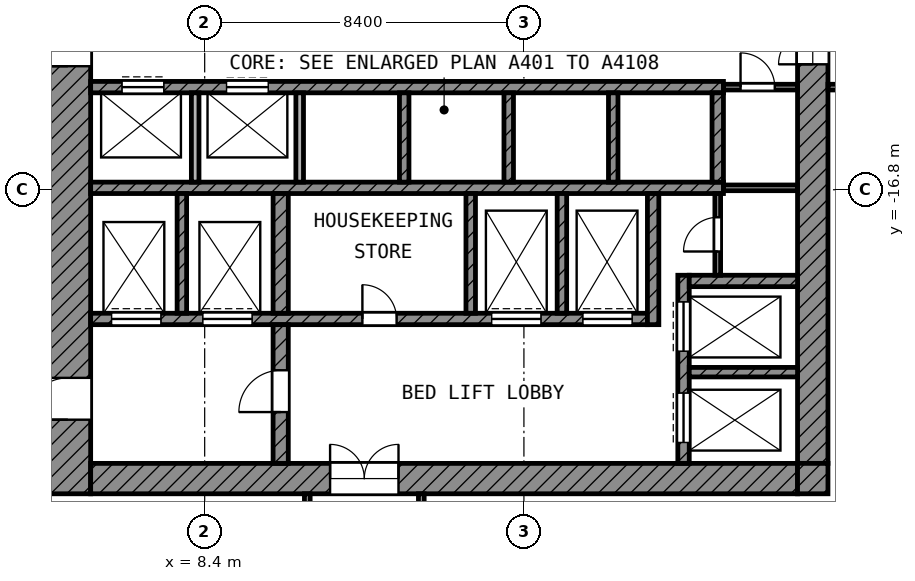
"""IFC4 building model, lengths in metres.
Left out: names, types, materials, properties, quantities, classifications, styles, units other than length and angle.
Written with IfcOpenShell. Run it as: python <this file> out.ifc"""

import sys

from ifc_helpers import new_model, si_unit, direction, frame, frame_2d, origin, place, context, subcontext, project, spatial, rectangle, extrude, element, fill, save


model = new_model("IFC4")
c1 = context("Model", 3, precision=1e-05, world=origin(), true_north=direction((0.0, 1.0)))
c2 = subcontext(c1, "Body", "Model", "MODEL_VIEW")
j1 = project(units=[si_unit("LENGTHUNIT", "METRE"), si_unit("PLANEANGLEUNIT", "RADIAN")], contexts=[c1])
p1 = place(None, origin())
s1 = spatial("IfcSite", under=j1, at=p1, CompositionType="ELEMENT")
p2 = place(p1, origin())
s2 = spatial("IfcBuilding", under=s1, at=p2, CompositionType="ELEMENT")
p3 = place(p2, frame((0.0, 0.0, 226.4)))
s3 = spatial("IfcBuildingStorey", under=s2, at=p3, CompositionType="ELEMENT", Elevation=226.4)
p4 = place(p3, frame((4.8, -24.8, 0.0), z_axis=(0.0, 0.0, 1.0), x_axis=(0.0, 1.0, 0.0)))
e1 = element("IfcWall", 1, at=p4, inside=s3, PredefinedType="SHEAR", context=c2, shape_type="SweptSolid", body=[
    extrude(rectangle(XDim=19.4, YDim=1.2, at=frame_2d((9.7, 0.0))), origin(), (0.0, 0.0, 1.0), 3.6),
])
p5 = place(p4, frame((11.25, 0.0, 0.0)))
e2 = element("IfcOpeningElement", 2, at=p5, cuts=e1, PredefinedType="OPENING", context=c2, shape_type="SweptSolid", body=[
    extrude(rectangle(XDim=1.1, YDim=2.1, at=frame_2d((0.55, 1.05))), frame((0.0, 0.61, 0.0), z_axis=(0.0, -1.0, 0.0), x_axis=(1.0, 0.0, 0.0)), (0.0, 0.0, 1.0), 1.22),
])
p6 = place(p4, frame((1.95, 0.0, 0.0)))
e3 = element("IfcOpeningElement", 3, at=p6, cuts=e1, PredefinedType="OPENING", context=c2, shape_type="SweptSolid", body=[
    extrude(rectangle(XDim=1.1, YDim=2.1, at=frame_2d((0.55, 1.05))), frame((0.0, 0.61, 0.0), z_axis=(0.0, -1.0, 0.0), x_axis=(1.0, 0.0, 0.0)), (0.0, 0.0, 1.0), 1.22),
])
p7 = place(p3, frame((24.4, -24.0, 0.0), z_axis=(0.0, 0.0, 1.0), x_axis=(0.0, 1.0, 0.0)))
e4 = element("IfcWall", 4, at=p7, inside=s3, PredefinedType="SHEAR", context=c2, shape_type="SweptSolid", body=[
    extrude(rectangle(XDim=18.6, YDim=0.8, at=frame_2d((9.3, 0.0))), origin(), (0.0, 0.0, 1.0), 3.6),
])
p8 = place(p7, frame((10.5, 0.0, 0.0)))
e5 = element("IfcOpeningElement", 5, at=p8, cuts=e4, PredefinedType="OPENING", context=c2, shape_type="SweptSolid", body=[
    extrude(rectangle(XDim=1.8, YDim=2.1, at=frame_2d((0.9, 1.05))), frame((0.0, 0.41, 0.0), z_axis=(0.0, -1.0, 0.0), x_axis=(1.0, 0.0, 0.0)), (0.0, 0.0, 1.0), 0.82),
])
p9 = place(p3, frame((5.4, -24.4, 0.0), z_axis=(0.0, 0.0, 1.0), x_axis=(1.0, 0.0, 0.0)))
e6 = element("IfcWall", 6, at=p9, inside=s3, PredefinedType="SHEAR", context=c2, shape_type="SweptSolid", body=[
    extrude(rectangle(XDim=18.6, YDim=0.8, at=frame_2d((9.3, 0.0))), origin(), (0.0, 0.0, 1.0), 3.6),
])
p10 = place(p9, frame((6.3, 0.0, 0.0)))
e7 = element("IfcOpeningElement", 7, at=p10, cuts=e6, PredefinedType="OPENING", context=c2, shape_type="SweptSolid", body=[
    extrude(rectangle(XDim=1.8, YDim=2.1, at=frame_2d((0.9, 1.05))), frame((0.0, 0.41, 0.0), z_axis=(0.0, -1.0, 0.0), x_axis=(1.0, 0.0, 0.0)), (0.0, 0.0, 1.0), 0.82),
])
p11 = place(p3, frame((24.4, -24.8, 0.0), z_axis=(0.0, 0.0, 1.0), x_axis=(0.0, 1.0, 0.0)))
e8 = element("IfcWall", 8, at=p11, inside=s3, PredefinedType="SHEAR", context=c2, shape_type="SweptSolid", body=[
    extrude(rectangle(XDim=0.8, YDim=0.8, at=frame_2d((0.4, 0.0))), origin(), (0.0, 0.0, 1.0), 3.6),
])
p12 = place(p3, frame((5.4, -14.1, 0.0), z_axis=(0.0, 0.0, 1.0), x_axis=(1.0, 0.0, 0.0)))
e9 = element("IfcWall", 9, at=p12, inside=s3, PredefinedType="SHEAR", context=c2, shape_type="SweptSolid", body=[
    extrude(rectangle(XDim=16.65, YDim=0.3, at=frame_2d((8.325, 0.0))), origin(), (0.0, 0.0, 1.0), 3.6),
])
p13 = place(p12, frame((0.825, 0.0, 0.0)))
e10 = element("IfcOpeningElement", 10, at=p13, cuts=e9, PredefinedType="OPENING", context=c2, shape_type="SweptSolid", body=[
    extrude(rectangle(XDim=1.1, YDim=2.1, at=frame_2d((0.55, 1.05))), frame((0.0, 0.16, 0.0), z_axis=(0.0, -1.0, 0.0), x_axis=(1.0, 0.0, 0.0)), (0.0, 0.0, 1.0), 0.32),
])
p14 = place(p12, frame((3.575, 0.0, 0.0)))
e11 = element("IfcOpeningElement", 11, at=p14, cuts=e9, PredefinedType="OPENING", context=c2, shape_type="SweptSolid", body=[
    extrude(rectangle(XDim=1.1, YDim=2.1, at=frame_2d((0.55, 1.05))), frame((0.0, 0.16, 0.0), z_axis=(0.0, -1.0, 0.0), x_axis=(1.0, 0.0, 0.0)), (0.0, 0.0, 1.0), 0.32),
])
p15 = place(p3, frame((5.4, -16.75, 0.0), z_axis=(0.0, 0.0, 1.0), x_axis=(1.0, 0.0, 0.0)))
e12 = element("IfcWall", 12, at=p15, inside=s3, PredefinedType="SHEAR", context=c2, shape_type="SweptSolid", body=[
    extrude(rectangle(XDim=16.65, YDim=0.3, at=frame_2d((8.325, 0.0))), origin(), (0.0, 0.0, 1.0), 3.6),
])
p16 = place(p3, frame((5.4, -20.2, 0.0), z_axis=(0.0, 0.0, 1.0), x_axis=(1.0, 0.0, 0.0)))
e13 = element("IfcWall", 13, at=p16, inside=s3, PredefinedType="SHEAR", context=c2, shape_type="SweptSolid", body=[
    extrude(rectangle(XDim=14.65, YDim=0.3, at=frame_2d((7.325, 0.0))), origin(), (0.0, 0.0, 1.0), 3.6),
])
p17 = place(p16, frame((10.55, 0.0, 0.0)))
e14 = element("IfcOpeningElement", 14, at=p17, cuts=e13, PredefinedType="OPENING", context=c2, shape_type="SweptSolid", body=[
    extrude(rectangle(XDim=1.3, YDim=2.1, at=frame_2d((0.65, 1.05))), frame((0.0, 0.16, 0.0), z_axis=(0.0, -1.0, 0.0), x_axis=(1.0, 0.0, 0.0)), (0.0, 0.0, 1.0), 0.32),
])
p18 = place(p16, frame((12.95, 0.0, 0.0)))
e15 = element("IfcOpeningElement", 15, at=p18, cuts=e13, PredefinedType="OPENING", context=c2, shape_type="SweptSolid", body=[
    extrude(rectangle(XDim=1.3, YDim=2.1, at=frame_2d((0.65, 1.05))), frame((0.0, 0.16, 0.0), z_axis=(0.0, -1.0, 0.0), x_axis=(1.0, 0.0, 0.0)), (0.0, 0.0, 1.0), 0.32),
])
p19 = place(p16, frame((0.55, 0.0, 0.0)))
e16 = element("IfcOpeningElement", 16, at=p19, cuts=e13, PredefinedType="OPENING", context=c2, shape_type="SweptSolid", body=[
    extrude(rectangle(XDim=1.3, YDim=2.1, at=frame_2d((0.65, 1.05))), frame((0.0, 0.16, 0.0), z_axis=(0.0, -1.0, 0.0), x_axis=(1.0, 0.0, 0.0)), (0.0, 0.0, 1.0), 0.32),
])
p20 = place(p16, frame((2.95, 0.0, 0.0)))
e17 = element("IfcOpeningElement", 17, at=p20, cuts=e13, PredefinedType="OPENING", context=c2, shape_type="SweptSolid", body=[
    extrude(rectangle(XDim=1.3, YDim=2.1, at=frame_2d((0.65, 1.05))), frame((0.0, 0.16, 0.0), z_axis=(0.0, -1.0, 0.0), x_axis=(1.0, 0.0, 0.0)), (0.0, 0.0, 1.0), 0.32),
])
p21 = place(p16, frame((7.15, 0.0, 0.0)))
e18 = element("IfcOpeningElement", 18, at=p21, cuts=e13, PredefinedType="OPENING", context=c2, shape_type="SweptSolid", body=[
    extrude(rectangle(XDim=0.9, YDim=2.1, at=frame_2d((0.45, 1.05))), frame((0.0, 0.16, 0.0), z_axis=(0.0, -1.0, 0.0), x_axis=(1.0, 0.0, 0.0)), (0.0, 0.0, 1.0), 0.32),
])
p22 = place(p3, frame((10.4, -24.0, 0.0), z_axis=(0.0, 0.0, 1.0), x_axis=(0.0, 1.0, 0.0)))
e19 = element("IfcWall", 19, at=p22, inside=s3, PredefinedType="SHEAR", context=c2, shape_type="SweptSolid", body=[
    extrude(rectangle(XDim=3.65, YDim=0.4, at=frame_2d((1.825, 0.0))), origin(), (0.0, 0.0, 1.0), 3.6),
])
p23 = place(p22, frame((1.35, 0.0, 0.0)))
e20 = element("IfcOpeningElement", 20, at=p23, cuts=e19, PredefinedType="OPENING", context=c2, shape_type="SweptSolid", body=[
    extrude(rectangle(XDim=1.1, YDim=2.1, at=frame_2d((0.55, 1.05))), frame((0.0, 0.21, 0.0), z_axis=(0.0, -1.0, 0.0), x_axis=(1.0, 0.0, 0.0)), (0.0, 0.0, 1.0), 0.42),
])
p24 = place(p3, frame((10.4, -20.05, 0.0), z_axis=(0.0, 0.0, 1.0), x_axis=(0.0, 1.0, 0.0)))
e21 = element("IfcWall", 21, at=p24, inside=s3, PredefinedType="SHEAR", context=c2, shape_type="SweptSolid", body=[
    extrude(rectangle(XDim=3.15, YDim=0.4, at=frame_2d((1.575, 0.0))), origin(), (0.0, 0.0, 1.0), 3.6),
])
p25 = place(p3, frame((20.2, -20.35, 0.0), z_axis=(0.0, 0.0, 1.0), x_axis=(0.0, 1.0, 0.0)))
e22 = element("IfcWall", 22, at=p25, inside=s3, PredefinedType="SHEAR", context=c2, shape_type="SweptSolid", body=[
    extrude(rectangle(XDim=3.45, YDim=0.3, at=frame_2d((1.725, 0.0))), origin(), (0.0, 0.0, 1.0), 3.6),
])
p26 = place(p3, frame((21.9, -16.6, 0.0), z_axis=(0.0, 0.0, 1.0), x_axis=(0.0, 1.0, 0.0)))
e23 = element("IfcWall", 23, at=p26, inside=s3, PredefinedType="SHEAR", context=c2, shape_type="SweptSolid", body=[
    extrude(rectangle(XDim=2.35, YDim=0.3, at=frame_2d((1.175, 0.0))), origin(), (0.0, 0.0, 1.0), 3.6),
])
p27 = place(p3, frame((21.15, -19.2, 0.0), z_axis=(0.0, 0.0, 1.0), x_axis=(1.0, 0.0, 0.0)))
e24 = element("IfcWall", 24, at=p27, inside=s3, PredefinedType="SHEAR", context=c2, shape_type="SweptSolid", body=[
    extrude(rectangle(XDim=2.85, YDim=0.3, at=frame_2d((1.425, 0.0))), origin(), (0.0, 0.0, 1.0), 3.6),
])
p28 = place(p3, frame((21.0, -24.0, 0.0), z_axis=(0.0, 0.0, 1.0), x_axis=(0.0, 1.0, 0.0)))
e25 = element("IfcWall", 25, at=p28, inside=s3, PredefinedType="SHEAR", context=c2, shape_type="SweptSolid", body=[
    extrude(rectangle(XDim=4.95, YDim=0.3, at=frame_2d((2.475, 0.0))), origin(), (0.0, 0.0, 1.0), 3.6),
])
p29 = place(p28, frame((2.95, 0.0, 0.0)))
e26 = element("IfcOpeningElement", 26, at=p29, cuts=e25, PredefinedType="OPENING", context=c2, shape_type="SweptSolid", body=[
    extrude(rectangle(XDim=1.3, YDim=2.1, at=frame_2d((0.65, 1.05))), frame((0.0, 0.16, 0.0), z_axis=(0.0, -1.0, 0.0), x_axis=(1.0, 0.0, 0.0)), (0.0, 0.0, 1.0), 0.32),
])
p30 = place(p28, frame((0.55, 0.0, 0.0)))
e27 = element("IfcOpeningElement", 27, at=p30, cuts=e25, PredefinedType="OPENING", context=c2, shape_type="SweptSolid", body=[
    extrude(rectangle(XDim=1.3, YDim=2.1, at=frame_2d((0.65, 1.05))), frame((0.0, 0.16, 0.0), z_axis=(0.0, -1.0, 0.0), x_axis=(1.0, 0.0, 0.0)), (0.0, 0.0, 1.0), 0.32),
])
p31 = place(p3, frame((21.15, -21.6, 0.0), z_axis=(0.0, 0.0, 1.0), x_axis=(1.0, 0.0, 0.0)))
e28 = element("IfcWall", 28, at=p31, inside=s3, PredefinedType="SHEAR", context=c2, shape_type="SweptSolid", body=[
    extrude(rectangle(XDim=2.85, YDim=0.25, at=frame_2d((1.425, 0.0))), origin(), (0.0, 0.0, 1.0), 3.6),
])
for number, where, z_axis, x_axis in (
    (29, (7.8, -20.05, 0.0), (0.0, 0.0, 1.0), (0.0, 1.0, 0.0)),
    (30, (15.4, -20.05, 0.0), (0.0, 0.0, 1.0), (0.0, 1.0, 0.0)),
    (31, (17.8, -20.05, 0.0), (0.0, 0.0, 1.0), (0.0, 1.0, 0.0)),
):
    element("IfcWall", number, at=place(p3, frame(where, z_axis=z_axis, x_axis=x_axis)), inside=s3, PredefinedType="SHEAR", context=c2, shape_type="SweptSolid", body=[
        extrude(rectangle(XDim=3.15, YDim=0.25, at=frame_2d((1.575, 0.0))), origin(), (0.0, 0.0, 1.0), 3.6),
    ])
for number, where, z_axis, x_axis in (
    (32, (8.15, -16.6, 0.0), (0.0, 0.0, 1.0), (0.0, 1.0, 0.0)),
    (33, (10.9, -16.6, 0.0), (0.0, 0.0, 1.0), (0.0, 1.0, 0.0)),
):
    element("IfcWall", number, at=place(p3, frame(where, z_axis=z_axis, x_axis=x_axis)), inside=s3, PredefinedType="PARTITIONING", context=c2, shape_type="SweptSolid", body=[
        extrude(rectangle(XDim=2.35, YDim=0.2, at=frame_2d((1.175, 0.0))), origin(), (0.0, 0.0, 1.0), 3.6),
    ])
for number, where, z_axis, x_axis in (
    (34, (13.65, -16.6, 0.0), (0.0, 0.0, 1.0), (0.0, 1.0, 0.0)),
    (35, (16.4, -16.6, 0.0), (0.0, 0.0, 1.0), (0.0, 1.0, 0.0)),
    (36, (19.15, -16.6, 0.0), (0.0, 0.0, 1.0), (0.0, 1.0, 0.0)),
):
    element("IfcWall", number, at=place(p3, frame(where, z_axis=z_axis, x_axis=x_axis)), inside=s3, PredefinedType="SHEAR", context=c2, shape_type="SweptSolid", body=[
        extrude(rectangle(XDim=2.35, YDim=0.25, at=frame_2d((1.175, 0.0))), origin(), (0.0, 0.0, 1.0), 3.6),
    ])
p32 = place(p3, frame((21.9, -19.05, 0.0), z_axis=(0.0, 0.0, 1.0), x_axis=(0.0, 1.0, 0.0)))
e37 = element("IfcWall", 37, at=p32, inside=s3, PredefinedType="PARTITIONING", context=c2, shape_type="SweptSolid", body=[
    extrude(rectangle(XDim=2.15, YDim=0.15, at=frame_2d((1.075, 0.0))), origin(), (0.0, 0.0, 1.0), 3.6),
])
p33 = place(p32, frame((0.625, 0.0, 0.0)))
e38 = element("IfcOpeningElement", 38, at=p33, cuts=e37, PredefinedType="OPENING", context=c2, shape_type="SweptSolid", body=[
    extrude(rectangle(XDim=0.9, YDim=2.1, at=frame_2d((0.45, 1.05))), frame((0.0, 0.085, 0.0), z_axis=(0.0, -1.0, 0.0), x_axis=(1.0, 0.0, 0.0)), (0.0, 0.0, 1.0), 0.17),
])
p34 = place(p3, frame((22.05, -16.75, 0.0), z_axis=(0.0, 0.0, 1.0), x_axis=(1.0, 0.0, 0.0)))
e39 = element("IfcWall", 39, at=p34, inside=s3, PredefinedType="PARTITIONING", context=c2, shape_type="SweptSolid", body=[
    extrude(rectangle(XDim=1.95, YDim=0.15, at=frame_2d((0.975, 0.0))), origin(), (0.0, 0.0, 1.0), 3.6),
])
p35 = place(p3, frame((22.05, -14.1, 0.0), z_axis=(0.0, 0.0, 1.0), x_axis=(1.0, 0.0, 0.0)))
e40 = element("IfcWall", 40, at=p35, inside=s3, PredefinedType="PARTITIONING", context=c2, shape_type="SweptSolid", body=[
    extrude(rectangle(XDim=1.95, YDim=0.15, at=frame_2d((0.975, 0.0))), origin(), (0.0, 0.0, 1.0), 3.6),
])
p36 = place(p35, frame((0.45, 0.0, 0.0)))
e41 = element("IfcOpeningElement", 41, at=p36, cuts=e40, PredefinedType="OPENING", context=c2, shape_type="SweptSolid", body=[
    extrude(rectangle(XDim=0.9, YDim=2.1, at=frame_2d((0.45, 1.05))), frame((0.0, 0.085, 0.0), z_axis=(0.0, -1.0, 0.0), x_axis=(1.0, 0.0, 0.0)), (0.0, 0.0, 1.0), 0.17),
])
p37 = place(p3, frame((24.8, -14.1, 0.0), z_axis=(0.0, 0.0, 1.0), x_axis=(1.0, 0.0, 0.0)))
e42 = element("IfcWall", 42, at=p37, inside=s3, PredefinedType="PARTITIONING", context=c2, shape_type="SweptSolid", body=[
    extrude(rectangle(XDim=4.525, YDim=0.15, at=frame_2d((2.262, 0.0))), origin(), (0.0, 0.0, 1.0), 3.6),
])
p38 = place(p37, frame((2.7, 0.0, 0.0)))
e43 = element("IfcOpeningElement", 43, at=p38, cuts=e42, PredefinedType="OPENING", context=c2, shape_type="SweptSolid", body=[
    extrude(rectangle(XDim=1.0, YDim=2.1, at=frame_2d((0.5, 1.05))), frame((0.0, 0.085, 0.0), z_axis=(0.0, -1.0, 0.0), x_axis=(1.0, 0.0, 0.0)), (0.0, 0.0, 1.0), 0.17),
])
p39 = place(p37, frame((1.3, 0.0, 0.0)))
e44 = element("IfcOpeningElement", 44, at=p39, cuts=e42, PredefinedType="OPENING", context=c2, shape_type="SweptSolid", body=[
    extrude(rectangle(XDim=1.0, YDim=2.1, at=frame_2d((0.5, 1.05))), frame((0.0, 0.085, 0.0), z_axis=(0.0, -1.0, 0.0), x_axis=(1.0, 0.0, 0.0)), (0.0, 0.0, 1.0), 0.17),
])
p40 = place(p3, frame((11.1, -29.4, 0.0), z_axis=(0.0, 0.0, 1.0), x_axis=(0.0, 1.0, 0.0)))
e45 = element("IfcWall", 45, at=p40, inside=s3, PredefinedType="PARTITIONING", context=c2, shape_type="SweptSolid", body=[
    extrude(rectangle(XDim=4.6, YDim=0.15, at=frame_2d((2.3, 0.0))), origin(), (0.0, 0.0, 1.0), 3.6),
])
p41 = place(p40, frame((1.65, 0.0, 0.0)))
e46 = element("IfcOpeningElement", 46, at=p41, cuts=e45, PredefinedType="OPENING", context=c2, shape_type="SweptSolid", body=[
    extrude(rectangle(XDim=0.9, YDim=2.1, at=frame_2d((0.45, 1.05))), frame((0.0, 0.085, 0.0), z_axis=(0.0, -1.0, 0.0), x_axis=(1.0, 0.0, 0.0)), (0.0, 0.0, 1.0), 0.17),
])
p42 = place(p3, frame((14.1, -29.4, 0.0), z_axis=(0.0, 0.0, 1.0), x_axis=(0.0, 1.0, 0.0)))
e47 = element("IfcWall", 47, at=p42, inside=s3, PredefinedType="PARTITIONING", context=c2, shape_type="SweptSolid", body=[
    extrude(rectangle(XDim=4.6, YDim=0.15, at=frame_2d((2.3, 0.0))), origin(), (0.0, 0.0, 1.0), 3.6),
])
p43 = place(p13, origin())
e48 = element("IfcDoor", 48, at=p43, inside=s3, OperationType="DOUBLE_DOOR_SLIDING", PredefinedType="DOOR", context=c2, shape_type="SweptSolid", body=[
    extrude(rectangle(XDim=1.1, YDim=2.1, at=frame_2d((0.55, 1.05))), frame((0.0, 0.025, 0.0), z_axis=(0.0, -1.0, 0.0), x_axis=(1.0, 0.0, 0.0)), (0.0, 0.0, 1.0), 0.05),
])
fill(e10, e48)
p44 = place(p14, origin())
e49 = element("IfcDoor", 49, at=p44, inside=s3, OperationType="DOUBLE_DOOR_SLIDING", PredefinedType="DOOR", context=c2, shape_type="SweptSolid", body=[
    extrude(rectangle(XDim=1.1, YDim=2.1, at=frame_2d((0.55, 1.05))), frame((0.0, 0.025, 0.0), z_axis=(0.0, -1.0, 0.0), x_axis=(1.0, 0.0, 0.0)), (0.0, 0.0, 1.0), 0.05),
])
fill(e11, e49)
p45 = place(p29, origin())
e50 = element("IfcDoor", 50, at=p45, inside=s3, OperationType="DOUBLE_DOOR_SLIDING", PredefinedType="DOOR", context=c2, shape_type="SweptSolid", body=[
    extrude(rectangle(XDim=1.3, YDim=2.1, at=frame_2d((0.65, 1.05))), frame((0.0, 0.025, 0.0), z_axis=(0.0, -1.0, 0.0), x_axis=(1.0, 0.0, 0.0)), (0.0, 0.0, 1.0), 0.05),
])
fill(e26, e50)
p46 = place(p30, origin())
e51 = element("IfcDoor", 51, at=p46, inside=s3, OperationType="DOUBLE_DOOR_SLIDING", PredefinedType="DOOR", context=c2, shape_type="SweptSolid", body=[
    extrude(rectangle(XDim=1.3, YDim=2.1, at=frame_2d((0.65, 1.05))), frame((0.0, 0.025, 0.0), z_axis=(0.0, -1.0, 0.0), x_axis=(1.0, 0.0, 0.0)), (0.0, 0.0, 1.0), 0.05),
])
fill(e27, e51)
p47 = place(p17, origin())
e52 = element("IfcDoor", 52, at=p47, inside=s3, OperationType="DOUBLE_DOOR_SLIDING", PredefinedType="DOOR", context=c2, shape_type="SweptSolid", body=[
    extrude(rectangle(XDim=1.3, YDim=2.1, at=frame_2d((0.65, 1.05))), frame((0.0, 0.025, 0.0), z_axis=(0.0, -1.0, 0.0), x_axis=(1.0, 0.0, 0.0)), (0.0, 0.0, 1.0), 0.05),
])
fill(e14, e52)
p48 = place(p18, origin())
e53 = element("IfcDoor", 53, at=p48, inside=s3, OperationType="DOUBLE_DOOR_SLIDING", PredefinedType="DOOR", context=c2, shape_type="SweptSolid", body=[
    extrude(rectangle(XDim=1.3, YDim=2.1, at=frame_2d((0.65, 1.05))), frame((0.0, 0.025, 0.0), z_axis=(0.0, -1.0, 0.0), x_axis=(1.0, 0.0, 0.0)), (0.0, 0.0, 1.0), 0.05),
])
fill(e15, e53)
p49 = place(p19, origin())
e54 = element("IfcDoor", 54, at=p49, inside=s3, OperationType="DOUBLE_DOOR_SLIDING", PredefinedType="DOOR", context=c2, shape_type="SweptSolid", body=[
    extrude(rectangle(XDim=1.3, YDim=2.1, at=frame_2d((0.65, 1.05))), frame((0.0, 0.025, 0.0), z_axis=(0.0, -1.0, 0.0), x_axis=(1.0, 0.0, 0.0)), (0.0, 0.0, 1.0), 0.05),
])
fill(e16, e54)
p50 = place(p20, origin())
e55 = element("IfcDoor", 55, at=p50, inside=s3, OperationType="DOUBLE_DOOR_SLIDING", PredefinedType="DOOR", context=c2, shape_type="SweptSolid", body=[
    extrude(rectangle(XDim=1.3, YDim=2.1, at=frame_2d((0.65, 1.05))), frame((0.0, 0.025, 0.0), z_axis=(0.0, -1.0, 0.0), x_axis=(1.0, 0.0, 0.0)), (0.0, 0.0, 1.0), 0.05),
])
fill(e17, e55)
p51 = place(p5, origin())
e56 = element("IfcDoor", 56, at=p51, inside=s3, OperationType="SINGLE_SWING_LEFT", PredefinedType="DOOR", context=c2, shape_type="SweptSolid", body=[
    extrude(rectangle(XDim=1.1, YDim=2.1, at=frame_2d((0.55, 1.05))), frame((0.0, 0.025, 0.0), z_axis=(0.0, -1.0, 0.0), x_axis=(1.0, 0.0, 0.0)), (0.0, 0.0, 1.0), 0.05),
])
fill(e2, e56)
p52 = place(p6, origin())
e57 = element("IfcDoor", 57, at=p52, inside=s3, OperationType="SINGLE_SWING_LEFT", PredefinedType="DOOR", context=c2, shape_type="SweptSolid", body=[
    extrude(rectangle(XDim=1.1, YDim=2.1, at=frame_2d((0.55, 1.05))), frame((0.0, 0.025, 0.0), z_axis=(0.0, -1.0, 0.0), x_axis=(1.0, 0.0, 0.0)), (0.0, 0.0, 1.0), 0.05),
])
fill(e3, e57)
p53 = place(p23, origin())
e58 = element("IfcDoor", 58, at=p53, inside=s3, OperationType="SINGLE_SWING_LEFT", PredefinedType="DOOR", context=c2, shape_type="SweptSolid", body=[
    extrude(rectangle(XDim=1.1, YDim=2.1, at=frame_2d((0.55, 1.05))), frame((0.0, 0.025, 0.0), z_axis=(0.0, -1.0, 0.0), x_axis=(1.0, 0.0, 0.0)), (0.0, 0.0, 1.0), 0.05),
])
fill(e20, e58)
p54 = place(p8, origin())
e59 = element("IfcDoor", 59, at=p54, inside=s3, OperationType="DOUBLE_DOOR_SINGLE_SWING", PredefinedType="DOOR", context=c2, shape_type="SweptSolid", body=[
    extrude(rectangle(XDim=1.8, YDim=2.1, at=frame_2d((0.9, 1.05))), frame((0.0, 0.025, 0.0), z_axis=(0.0, -1.0, 0.0), x_axis=(1.0, 0.0, 0.0)), (0.0, 0.0, 1.0), 0.05),
])
fill(e5, e59)
p55 = place(p10, origin())
e60 = element("IfcDoor", 60, at=p55, inside=s3, OperationType="DOUBLE_DOOR_SINGLE_SWING", PredefinedType="DOOR", context=c2, shape_type="SweptSolid", body=[
    extrude(rectangle(XDim=1.8, YDim=2.1, at=frame_2d((0.9, 1.05))), frame((0.0, 0.025, 0.0), z_axis=(0.0, -1.0, 0.0), x_axis=(1.0, 0.0, 0.0)), (0.0, 0.0, 1.0), 0.05),
])
fill(e7, e60)
p56 = place(p36, origin())
e61 = element("IfcDoor", 61, at=p56, inside=s3, OperationType="SINGLE_SWING_LEFT", PredefinedType="DOOR", context=c2, shape_type="SweptSolid", body=[
    extrude(rectangle(XDim=0.9, YDim=2.1, at=frame_2d((0.45, 1.05))), frame((0.0, 0.025, 0.0), z_axis=(0.0, -1.0, 0.0), x_axis=(1.0, 0.0, 0.0)), (0.0, 0.0, 1.0), 0.05),
])
fill(e41, e61)
p57 = place(p33, origin())
e62 = element("IfcDoor", 62, at=p57, inside=s3, OperationType="SINGLE_SWING_LEFT", PredefinedType="DOOR", context=c2, shape_type="SweptSolid", body=[
    extrude(rectangle(XDim=0.9, YDim=2.1, at=frame_2d((0.45, 1.05))), frame((0.0, 0.025, 0.0), z_axis=(0.0, -1.0, 0.0), x_axis=(1.0, 0.0, 0.0)), (0.0, 0.0, 1.0), 0.05),
])
fill(e38, e62)
p58 = place(p21, origin())
e63 = element("IfcDoor", 63, at=p58, inside=s3, OperationType="SINGLE_SWING_LEFT", PredefinedType="DOOR", context=c2, shape_type="SweptSolid", body=[
    extrude(rectangle(XDim=0.9, YDim=2.1, at=frame_2d((0.45, 1.05))), frame((0.0, 0.025, 0.0), z_axis=(0.0, -1.0, 0.0), x_axis=(1.0, 0.0, 0.0)), (0.0, 0.0, 1.0), 0.05),
])
fill(e18, e63)
save(model, sys.argv[1])
